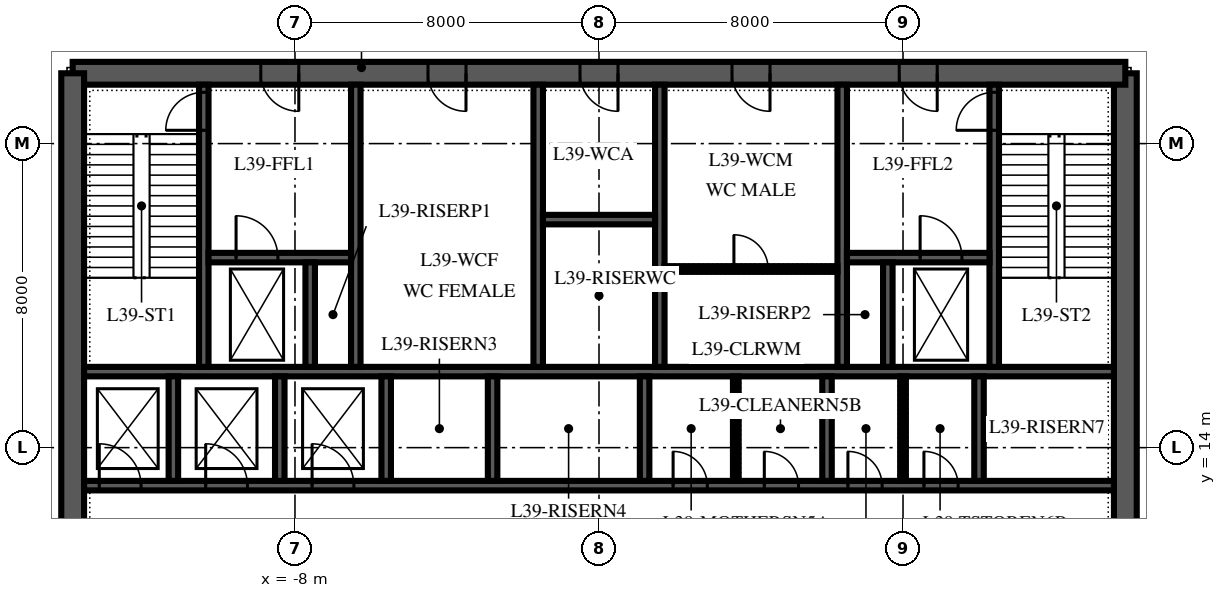
"""IFC4 building model, lengths in metres.
Left out: names, types, materials, properties, quantities, classifications, styles, units other than length and angle.
Written with IfcOpenShell. Run it as: python <this file> out.ifc"""

import sys

from ifc_helpers import new_model, si_unit, direction, frame, frame_2d, origin, place, context, subcontext, project, spatial, polyline, rectangle, outline, extrude, element, fill, save


model = new_model("IFC4")
c1 = context("Model", 3, precision=1e-05, world=origin(), true_north=direction((0.0, 1.0)))
c2 = subcontext(c1, "Body", "Model", "MODEL_VIEW")
j1 = project(units=[si_unit("LENGTHUNIT", "METRE"), si_unit("PLANEANGLEUNIT", "RADIAN")], contexts=[c1])
p1 = place(None, origin())
s1 = spatial("IfcSite", under=j1, at=p1, CompositionType="ELEMENT")
p2 = place(p1, origin())
s2 = spatial("IfcBuilding", under=s1, at=p2, CompositionType="ELEMENT")
p3 = place(p2, frame((0.0, 0.0, 173.0)))
s3 = spatial("IfcBuildingStorey", under=s2, at=p3, CompositionType="ELEMENT", Elevation=173.0)
p4 = place(p3, frame((13.85, 6.15, 0.0), z_axis=(0.0, 0.0, 1.0), x_axis=(0.0, 1.0, 0.0)))
e1 = element("IfcWall", 1, at=p4, inside=s3, PredefinedType="SHEAR", context=c2, shape_type="SweptSolid", body=[
    extrude(outline(polyline([(0.0, -0.3), (17.7, -0.3), (17.7, 0.0), (17.4, 0.0), (17.4, 0.3), (0.3, 0.3), (0.3, 0.0), (0.0, 0.0), (0.0, -0.3)])), origin(), (0.0, 0.0, 1.0), 5.0),
])
p5 = place(p4, frame((4.15, 0.0, 0.0)))
e2 = element("IfcOpeningElement", 2, at=p5, cuts=e1, PredefinedType="OPENING", context=c2, shape_type="SweptSolid", body=[
    extrude(rectangle(XDim=1.8, YDim=2.4, at=frame_2d((0.9, 1.2))), frame((0.0, 0.315, 0.0), z_axis=(0.0, -1.0, 0.0), x_axis=(1.0, 0.0, 0.0)), (0.0, 0.0, 1.0), 0.63),
])
p6 = place(p3, frame((13.85, 23.85, 0.0), z_axis=(0.0, 0.0, 1.0), x_axis=(-1.0, 0.0, 0.0)))
e3 = element("IfcWall", 3, at=p6, inside=s3, PredefinedType="SHEAR", context=c2, shape_type="SweptSolid", body=[
    extrude(rectangle(XDim=27.7, YDim=0.6, at=frame_2d((13.85, 0.0))), origin(), (0.0, 0.0, 1.0), 5.0),
])
p7 = place(p6, frame((21.75, 0.0, 0.0)))
e4 = element("IfcOpeningElement", 4, at=p7, cuts=e3, PredefinedType="OPENING", context=c2, shape_type="SweptSolid", body=[
    extrude(rectangle(XDim=1.0, YDim=2.1, at=frame_2d((0.5, 1.05))), frame((0.0, 0.315, 0.0), z_axis=(0.0, -1.0, 0.0), x_axis=(1.0, 0.0, 0.0)), (0.0, 0.0, 1.0), 0.63),
])
p8 = place(p6, frame((4.95, 0.0, 0.0)))
e5 = element("IfcOpeningElement", 5, at=p8, cuts=e3, PredefinedType="OPENING", context=c2, shape_type="SweptSolid", body=[
    extrude(rectangle(XDim=1.0, YDim=2.1, at=frame_2d((0.5, 1.05))), frame((0.0, 0.315, 0.0), z_axis=(0.0, -1.0, 0.0), x_axis=(1.0, 0.0, 0.0)), (0.0, 0.0, 1.0), 0.63),
])
p9 = place(p6, frame((17.35, 0.0, 0.0)))
e6 = element("IfcOpeningElement", 6, at=p9, cuts=e3, PredefinedType="OPENING", context=c2, shape_type="SweptSolid", body=[
    extrude(rectangle(XDim=1.0, YDim=2.1, at=frame_2d((0.5, 1.05))), frame((0.0, 0.315, 0.0), z_axis=(0.0, -1.0, 0.0), x_axis=(1.0, 0.0, 0.0)), (0.0, 0.0, 1.0), 0.63),
])
p10 = place(p6, frame((13.35, 0.0, 0.0)))
e7 = element("IfcOpeningElement", 7, at=p10, cuts=e3, PredefinedType="OPENING", context=c2, shape_type="SweptSolid", body=[
    extrude(rectangle(XDim=1.0, YDim=2.1, at=frame_2d((0.5, 1.05))), frame((0.0, 0.315, 0.0), z_axis=(0.0, -1.0, 0.0), x_axis=(1.0, 0.0, 0.0)), (0.0, 0.0, 1.0), 0.63),
])
p11 = place(p6, frame((9.35, 0.0, 0.0)))
e8 = element("IfcOpeningElement", 8, at=p11, cuts=e3, PredefinedType="OPENING", context=c2, shape_type="SweptSolid", body=[
    extrude(rectangle(XDim=1.0, YDim=2.1, at=frame_2d((0.5, 1.05))), frame((0.0, 0.315, 0.0), z_axis=(0.0, -1.0, 0.0), x_axis=(1.0, 0.0, 0.0)), (0.0, 0.0, 1.0), 0.63),
])
p12 = place(p3, frame((-13.85, 23.85, 0.0), z_axis=(0.0, 0.0, 1.0), x_axis=(0.0, -1.0, 0.0)))
e9 = element("IfcWall", 9, at=p12, inside=s3, PredefinedType="SHEAR", context=c2, shape_type="SweptSolid", body=[
    extrude(outline(polyline([(0.0, -0.3), (17.7, -0.3), (17.7, 0.0), (17.4, 0.0), (17.4, 0.3), (0.3, 0.3), (0.3, 0.0), (0.0, 0.0), (0.0, -0.3)])), origin(), (0.0, 0.0, 1.0), 5.0),
])
p13 = place(p12, frame((11.75, 0.0, 0.0)))
e10 = element("IfcOpeningElement", 10, at=p13, cuts=e9, PredefinedType="OPENING", context=c2, shape_type="SweptSolid", body=[
    extrude(rectangle(XDim=1.8, YDim=2.4, at=frame_2d((0.9, 1.2))), frame((0.0, 0.315, 0.0), z_axis=(0.0, -1.0, 0.0), x_axis=(1.0, 0.0, 0.0)), (0.0, 0.0, 1.0), 0.63),
])
p14 = place(p3, frame((-13.55, 13.0, 0.0), z_axis=(0.0, 0.0, 1.0), x_axis=(1.0, 0.0, 0.0)))
e11 = element("IfcWall", 11, at=p14, inside=s3, PredefinedType="SHEAR", context=c2, shape_type="SweptSolid", body=[
    extrude(rectangle(XDim=27.1, YDim=0.25, at=frame_2d((13.55, 0.0))), origin(), (0.0, 0.0, 1.0), 5.0),
])
p15 = place(p14, frame((0.4, 0.0, 0.0)))
e12 = element("IfcOpeningElement", 12, at=p15, cuts=e11, PredefinedType="OPENING", context=c2, shape_type="SweptSolid", body=[
    extrude(rectangle(XDim=1.1, YDim=2.1, at=frame_2d((0.55, 1.05))), frame((0.0, 0.14, 0.0), z_axis=(0.0, -1.0, 0.0), x_axis=(1.0, 0.0, 0.0)), (0.0, 0.0, 1.0), 0.28),
])
p16 = place(p14, frame((3.2, 0.0, 0.0)))
e13 = element("IfcOpeningElement", 13, at=p16, cuts=e11, PredefinedType="OPENING", context=c2, shape_type="SweptSolid", body=[
    extrude(rectangle(XDim=1.1, YDim=2.1, at=frame_2d((0.55, 1.05))), frame((0.0, 0.14, 0.0), z_axis=(0.0, -1.0, 0.0), x_axis=(1.0, 0.0, 0.0)), (0.0, 0.0, 1.0), 0.28),
])
p17 = place(p14, frame((6.0, 0.0, 0.0)))
e14 = element("IfcOpeningElement", 14, at=p17, cuts=e11, PredefinedType="OPENING", context=c2, shape_type="SweptSolid", body=[
    extrude(rectangle(XDim=1.1, YDim=2.1, at=frame_2d((0.55, 1.05))), frame((0.0, 0.14, 0.0), z_axis=(0.0, -1.0, 0.0), x_axis=(1.0, 0.0, 0.0)), (0.0, 0.0, 1.0), 0.28),
])
p18 = place(p14, frame((15.5, 0.0, 0.0)))
e15 = element("IfcOpeningElement", 15, at=p18, cuts=e11, PredefinedType="OPENING", context=c2, shape_type="SweptSolid", body=[
    extrude(rectangle(XDim=0.9, YDim=2.1, at=frame_2d((0.45, 1.05))), frame((0.0, 0.14, 0.0), z_axis=(0.0, -1.0, 0.0), x_axis=(1.0, 0.0, 0.0)), (0.0, 0.0, 1.0), 0.28),
])
p19 = place(p14, frame((17.9, 0.0, 0.0)))
e16 = element("IfcOpeningElement", 16, at=p19, cuts=e11, PredefinedType="OPENING", context=c2, shape_type="SweptSolid", body=[
    extrude(rectangle(XDim=0.9, YDim=2.1, at=frame_2d((0.45, 1.05))), frame((0.0, 0.14, 0.0), z_axis=(0.0, -1.0, 0.0), x_axis=(1.0, 0.0, 0.0)), (0.0, 0.0, 1.0), 0.28),
])
p20 = place(p14, frame((20.1, 0.0, 0.0)))
e17 = element("IfcOpeningElement", 17, at=p20, cuts=e11, PredefinedType="OPENING", context=c2, shape_type="SweptSolid", body=[
    extrude(rectangle(XDim=0.9, YDim=2.1, at=frame_2d((0.45, 1.05))), frame((0.0, 0.14, 0.0), z_axis=(0.0, -1.0, 0.0), x_axis=(1.0, 0.0, 0.0)), (0.0, 0.0, 1.0), 0.28),
])
p21 = place(p14, frame((22.1, 0.0, 0.0)))
e18 = element("IfcOpeningElement", 18, at=p21, cuts=e11, PredefinedType="OPENING", context=c2, shape_type="SweptSolid", body=[
    extrude(rectangle(XDim=0.9, YDim=2.1, at=frame_2d((0.45, 1.05))), frame((0.0, 0.14, 0.0), z_axis=(0.0, -1.0, 0.0), x_axis=(1.0, 0.0, 0.0)), (0.0, 0.0, 1.0), 0.28),
])
p22 = place(p3, frame((-13.55, 16.0, 0.0), z_axis=(0.0, 0.0, 1.0), x_axis=(1.0, 0.0, 0.0)))
e19 = element("IfcWall", 19, at=p22, inside=s3, PredefinedType="SHEAR", context=c2, shape_type="SweptSolid", body=[
    extrude(rectangle(XDim=27.1, YDim=0.25, at=frame_2d((13.55, 0.0))), origin(), (0.0, 0.0, 1.0), 5.0),
])
for number, where, z_axis, x_axis in (
    (20, (-11.2, 13.125, 0.0), (0.0, 0.0, 1.0), (0.0, 1.0, 0.0)),
    (21, (-8.4, 13.125, 0.0), (0.0, 0.0, 1.0), (0.0, 1.0, 0.0)),
    (22, (-5.6, 13.125, 0.0), (0.0, 0.0, 1.0), (0.0, 1.0, 0.0)),
    (23, (-2.8, 13.125, 0.0), (0.0, 0.0, 1.0), (0.0, 1.0, 0.0)),
    (24, (1.2, 13.125, 0.0), (0.0, 0.0, 1.0), (0.0, 1.0, 0.0)),
    (25, (6.0, 13.125, 0.0), (0.0, 0.0, 1.0), (0.0, 1.0, 0.0)),
    (26, (10.0, 13.125, 0.0), (0.0, 0.0, 1.0), (0.0, 1.0, 0.0)),
):
    element("IfcWall", number, at=place(p3, frame(where, z_axis=z_axis, x_axis=x_axis)), inside=s3, PredefinedType="SHEAR", context=c2, shape_type="SweptSolid", body=[
        extrude(rectangle(XDim=2.75, YDim=0.25, at=frame_2d((1.375, 0.0))), origin(), (0.0, 0.0, 1.0), 5.0),
    ])
p23 = place(p3, frame((-10.4, 16.125, 0.0), z_axis=(0.0, 0.0, 1.0), x_axis=(0.0, 1.0, 0.0)))
e27 = element("IfcWall", 27, at=p23, inside=s3, PredefinedType="SHEAR", context=c2, shape_type="SweptSolid", body=[
    extrude(rectangle(XDim=7.425, YDim=0.25, at=frame_2d((3.712, 0.0))), origin(), (0.0, 0.0, 1.0), 5.0),
])
p24 = place(p23, frame((6.225, 0.0, 0.0)))
e28 = element("IfcOpeningElement", 28, at=p24, cuts=e27, PredefinedType="OPENING", context=c2, shape_type="SweptSolid", body=[
    extrude(rectangle(XDim=1.0, YDim=2.1, at=frame_2d((0.5, 1.05))), frame((0.0, 0.14, 0.0), z_axis=(0.0, -1.0, 0.0), x_axis=(1.0, 0.0, 0.0)), (0.0, 0.0, 1.0), 0.28),
])
for number, where, z_axis, x_axis in (
    (29, (-6.4, 16.125, 0.0), (0.0, 0.0, 1.0), (0.0, 1.0, 0.0)),
    (30, (-1.6, 16.125, 0.0), (0.0, 0.0, 1.0), (0.0, 1.0, 0.0)),
    (31, (1.6, 16.125, 0.0), (0.0, 0.0, 1.0), (0.0, 1.0, 0.0)),
    (32, (6.4, 16.125, 0.0), (0.0, 0.0, 1.0), (0.0, 1.0, 0.0)),
):
    element("IfcWall", number, at=place(p3, frame(where, z_axis=z_axis, x_axis=x_axis)), inside=s3, PredefinedType="SHEAR", context=c2, shape_type="SweptSolid", body=[
        extrude(rectangle(XDim=7.425, YDim=0.25, at=frame_2d((3.712, 0.0))), origin(), (0.0, 0.0, 1.0), 5.0),
    ])
p25 = place(p3, frame((10.4, 16.125, 0.0), z_axis=(0.0, 0.0, 1.0), x_axis=(0.0, 1.0, 0.0)))
e33 = element("IfcWall", 33, at=p25, inside=s3, PredefinedType="SHEAR", context=c2, shape_type="SweptSolid", body=[
    extrude(rectangle(XDim=7.425, YDim=0.25, at=frame_2d((3.712, 0.0))), origin(), (0.0, 0.0, 1.0), 5.0),
])
p26 = place(p25, frame((6.225, 0.0, 0.0)))
e34 = element("IfcOpeningElement", 34, at=p26, cuts=e33, PredefinedType="OPENING", context=c2, shape_type="SweptSolid", body=[
    extrude(rectangle(XDim=1.0, YDim=2.1, at=frame_2d((0.5, 1.05))), frame((0.0, 0.14, 0.0), z_axis=(0.0, -1.0, 0.0), x_axis=(1.0, 0.0, 0.0)), (0.0, 0.0, 1.0), 0.28),
])
p27 = place(p3, frame((-10.275, 19.0, 0.0), z_axis=(0.0, 0.0, 1.0), x_axis=(1.0, 0.0, 0.0)))
e35 = element("IfcWall", 35, at=p27, inside=s3, PredefinedType="SHEAR", context=c2, shape_type="SweptSolid", body=[
    extrude(rectangle(XDim=3.75, YDim=0.25, at=frame_2d((1.875, 0.0))), origin(), (0.0, 0.0, 1.0), 5.0),
])
p28 = place(p27, frame((0.725, 0.0, 0.0)))
e36 = element("IfcOpeningElement", 36, at=p28, cuts=e35, PredefinedType="OPENING", context=c2, shape_type="SweptSolid", body=[
    extrude(rectangle(XDim=1.1, YDim=2.1, at=frame_2d((0.55, 1.05))), frame((0.0, 0.14, 0.0), z_axis=(0.0, -1.0, 0.0), x_axis=(1.0, 0.0, 0.0)), (0.0, 0.0, 1.0), 0.28),
])
p29 = place(p3, frame((6.525, 19.0, 0.0), z_axis=(0.0, 0.0, 1.0), x_axis=(1.0, 0.0, 0.0)))
e37 = element("IfcWall", 37, at=p29, inside=s3, PredefinedType="SHEAR", context=c2, shape_type="SweptSolid", body=[
    extrude(rectangle(XDim=3.75, YDim=0.25, at=frame_2d((1.875, 0.0))), origin(), (0.0, 0.0, 1.0), 5.0),
])
p30 = place(p29, frame((1.925, 0.0, 0.0)))
e38 = element("IfcOpeningElement", 38, at=p30, cuts=e37, PredefinedType="OPENING", context=c2, shape_type="SweptSolid", body=[
    extrude(rectangle(XDim=1.1, YDim=2.1, at=frame_2d((0.55, 1.05))), frame((0.0, 0.14, 0.0), z_axis=(0.0, -1.0, 0.0), x_axis=(1.0, 0.0, 0.0)), (0.0, 0.0, 1.0), 0.28),
])
for number, where, z_axis, x_axis in (
    (39, (-7.6, 16.125, 0.0), (0.0, 0.0, 1.0), (0.0, 1.0, 0.0)),
    (40, (7.6, 16.125, 0.0), (0.0, 0.0, 1.0), (0.0, 1.0, 0.0)),
):
    element("IfcWall", number, at=place(p3, frame(where, z_axis=z_axis, x_axis=x_axis)), inside=s3, PredefinedType="SHEAR", context=c2, shape_type="SweptSolid", body=[
        extrude(rectangle(XDim=2.75, YDim=0.25, at=frame_2d((1.375, 0.0))), origin(), (0.0, 0.0, 1.0), 5.0),
    ])
p31 = place(p3, frame((-1.475, 20.0, 0.0), z_axis=(0.0, 0.0, 1.0), x_axis=(1.0, 0.0, 0.0)))
e41 = element("IfcWall", 41, at=p31, inside=s3, PredefinedType="SHEAR", context=c2, shape_type="SweptSolid", body=[
    extrude(rectangle(XDim=2.95, YDim=0.25, at=frame_2d((1.475, 0.0))), origin(), (0.0, 0.0, 1.0), 5.0),
])
p32 = place(p3, frame((1.725, 18.7, 0.0), z_axis=(0.0, 0.0, 1.0), x_axis=(1.0, 0.0, 0.0)))
e42 = element("IfcWall", 42, at=p32, inside=s3, PredefinedType="PARTITIONING", context=c2, shape_type="SweptSolid", body=[
    extrude(rectangle(XDim=4.55, YDim=0.15, at=frame_2d((2.275, 0.0))), origin(), (0.0, 0.0, 1.0), 4.85),
])
p33 = place(p32, frame((1.825, 0.0, 0.0)))
e43 = element("IfcOpeningElement", 43, at=p33, cuts=e42, PredefinedType="OPENING", context=c2, shape_type="SweptSolid", body=[
    extrude(rectangle(XDim=0.9, YDim=2.1, at=frame_2d((0.45, 1.05))), frame((0.0, 0.09, 0.0), z_axis=(0.0, -1.0, 0.0), x_axis=(1.0, 0.0, 0.0)), (0.0, 0.0, 1.0), 0.18),
])
for number, where, z_axis, x_axis in (
    (44, (3.6, 13.125, 0.0), (0.0, 0.0, 1.0), (0.0, 1.0, 0.0)),
    (45, (8.0, 13.125, 0.0), (0.0, 0.0, 1.0), (0.0, 1.0, 0.0)),
):
    element("IfcWall", number, at=place(p3, frame(where, z_axis=z_axis, x_axis=x_axis)), inside=s3, PredefinedType="PARTITIONING", context=c2, shape_type="SweptSolid", body=[
        extrude(rectangle(XDim=2.75, YDim=0.15, at=frame_2d((1.375, 0.0))), origin(), (0.0, 0.0, 1.0), 4.85),
    ])
p34 = place(p7, origin())
e46 = element("IfcDoor", 46, at=p34, inside=s3, OperationType="SINGLE_SWING_RIGHT", PredefinedType="DOOR", context=c2, shape_type="SweptSolid", body=[
    extrude(rectangle(XDim=1.0, YDim=2.1, at=frame_2d((0.5, 1.05))), frame((0.0, 0.3, 0.0), z_axis=(0.0, -1.0, 0.0), x_axis=(1.0, 0.0, 0.0)), (0.0, 0.0, 1.0), 0.6),
])
fill(e4, e46)
p35 = place(p8, origin())
e47 = element("IfcDoor", 47, at=p35, inside=s3, OperationType="SINGLE_SWING_RIGHT", PredefinedType="DOOR", context=c2, shape_type="SweptSolid", body=[
    extrude(rectangle(XDim=1.0, YDim=2.1, at=frame_2d((0.5, 1.05))), frame((0.0, 0.3, 0.0), z_axis=(0.0, -1.0, 0.0), x_axis=(1.0, 0.0, 0.0)), (0.0, 0.0, 1.0), 0.6),
])
fill(e5, e47)
p36 = place(p9, origin())
e48 = element("IfcDoor", 48, at=p36, inside=s3, OperationType="SINGLE_SWING_LEFT", PredefinedType="DOOR", context=c2, shape_type="SweptSolid", body=[
    extrude(rectangle(XDim=1.0, YDim=2.1, at=frame_2d((0.5, 1.05))), frame((0.0, 0.3, 0.0), z_axis=(0.0, -1.0, 0.0), x_axis=(1.0, 0.0, 0.0)), (0.0, 0.0, 1.0), 0.6),
])
fill(e6, e48)
p37 = place(p10, origin())
e49 = element("IfcDoor", 49, at=p37, inside=s3, OperationType="SINGLE_SWING_LEFT", PredefinedType="DOOR", context=c2, shape_type="SweptSolid", body=[
    extrude(rectangle(XDim=1.0, YDim=2.1, at=frame_2d((0.5, 1.05))), frame((0.0, 0.3, 0.0), z_axis=(0.0, -1.0, 0.0), x_axis=(1.0, 0.0, 0.0)), (0.0, 0.0, 1.0), 0.6),
])
fill(e7, e49)
p38 = place(p11, origin())
e50 = element("IfcDoor", 50, at=p38, inside=s3, OperationType="SINGLE_SWING_LEFT", PredefinedType="DOOR", context=c2, shape_type="SweptSolid", body=[
    extrude(rectangle(XDim=1.0, YDim=2.1, at=frame_2d((0.5, 1.05))), frame((0.0, 0.3, 0.0), z_axis=(0.0, -1.0, 0.0), x_axis=(1.0, 0.0, 0.0)), (0.0, 0.0, 1.0), 0.6),
])
fill(e8, e50)
p39 = place(p24, origin())
e51 = element("IfcDoor", 51, at=p39, inside=s3, OperationType="SINGLE_SWING_LEFT", PredefinedType="DOOR", context=c2, shape_type="SweptSolid", body=[
    extrude(rectangle(XDim=1.0, YDim=2.1, at=frame_2d((0.5, 1.05))), frame((0.0, 0.125, 0.0), z_axis=(0.0, -1.0, 0.0), x_axis=(1.0, 0.0, 0.0)), (0.0, 0.0, 1.0), 0.25),
])
fill(e28, e51)
p40 = place(p26, origin())
e52 = element("IfcDoor", 52, at=p40, inside=s3, OperationType="SINGLE_SWING_LEFT", PredefinedType="DOOR", context=c2, shape_type="SweptSolid", body=[
    extrude(rectangle(XDim=1.0, YDim=2.1, at=frame_2d((0.5, 1.05))), frame((0.0, 0.125, 0.0), z_axis=(0.0, -1.0, 0.0), x_axis=(1.0, 0.0, 0.0)), (0.0, 0.0, 1.0), 0.25),
])
fill(e34, e52)
p41 = place(p15, origin())
e53 = element("IfcDoor", 53, at=p41, inside=s3, OperationType="SLIDING_TO_LEFT", PredefinedType="DOOR", context=c2, shape_type="SweptSolid", body=[
    extrude(rectangle(XDim=1.1, YDim=2.1, at=frame_2d((0.55, 1.05))), frame((0.0, 0.125, 0.0), z_axis=(0.0, -1.0, 0.0), x_axis=(1.0, 0.0, 0.0)), (0.0, 0.0, 1.0), 0.25),
])
fill(e12, e53)
p42 = place(p16, origin())
e54 = element("IfcDoor", 54, at=p42, inside=s3, OperationType="SLIDING_TO_LEFT", PredefinedType="DOOR", context=c2, shape_type="SweptSolid", body=[
    extrude(rectangle(XDim=1.1, YDim=2.1, at=frame_2d((0.55, 1.05))), frame((0.0, 0.125, 0.0), z_axis=(0.0, -1.0, 0.0), x_axis=(1.0, 0.0, 0.0)), (0.0, 0.0, 1.0), 0.25),
])
fill(e13, e54)
p43 = place(p17, origin())
e55 = element("IfcDoor", 55, at=p43, inside=s3, OperationType="SLIDING_TO_LEFT", PredefinedType="DOOR", context=c2, shape_type="SweptSolid", body=[
    extrude(rectangle(XDim=1.1, YDim=2.1, at=frame_2d((0.55, 1.05))), frame((0.0, 0.125, 0.0), z_axis=(0.0, -1.0, 0.0), x_axis=(1.0, 0.0, 0.0)), (0.0, 0.0, 1.0), 0.25),
])
fill(e14, e55)
p44 = place(p30, origin())
e56 = element("IfcDoor", 56, at=p44, inside=s3, OperationType="SLIDING_TO_RIGHT", PredefinedType="DOOR", context=c2, shape_type="SweptSolid", body=[
    extrude(rectangle(XDim=1.1, YDim=2.1, at=frame_2d((0.55, 1.05))), frame((0.0, 0.125, 0.0), z_axis=(0.0, -1.0, 0.0), x_axis=(1.0, 0.0, 0.0)), (0.0, 0.0, 1.0), 0.25),
])
fill(e38, e56)
p45 = place(p28, origin())
e57 = element("IfcDoor", 57, at=p45, inside=s3, OperationType="SLIDING_TO_RIGHT", PredefinedType="DOOR", context=c2, shape_type="SweptSolid", body=[
    extrude(rectangle(XDim=1.1, YDim=2.1, at=frame_2d((0.55, 1.05))), frame((0.0, 0.125, 0.0), z_axis=(0.0, -1.0, 0.0), x_axis=(1.0, 0.0, 0.0)), (0.0, 0.0, 1.0), 0.25),
])
fill(e36, e57)
p46 = place(p18, origin())
e58 = element("IfcDoor", 58, at=p46, inside=s3, OperationType="SINGLE_SWING_LEFT", PredefinedType="DOOR", context=c2, shape_type="SweptSolid", body=[
    extrude(rectangle(XDim=0.9, YDim=2.1, at=frame_2d((0.45, 1.05))), frame((0.0, 0.125, 0.0), z_axis=(0.0, -1.0, 0.0), x_axis=(1.0, 0.0, 0.0)), (0.0, 0.0, 1.0), 0.25),
])
fill(e15, e58)
p47 = place(p19, origin())
e59 = element("IfcDoor", 59, at=p47, inside=s3, OperationType="SINGLE_SWING_LEFT", PredefinedType="DOOR", context=c2, shape_type="SweptSolid", body=[
    extrude(rectangle(XDim=0.9, YDim=2.1, at=frame_2d((0.45, 1.05))), frame((0.0, 0.125, 0.0), z_axis=(0.0, -1.0, 0.0), x_axis=(1.0, 0.0, 0.0)), (0.0, 0.0, 1.0), 0.25),
])
fill(e16, e59)
p48 = place(p20, origin())
e60 = element("IfcDoor", 60, at=p48, inside=s3, OperationType="SINGLE_SWING_LEFT", PredefinedType="DOOR", context=c2, shape_type="SweptSolid", body=[
    extrude(rectangle(XDim=0.9, YDim=2.1, at=frame_2d((0.45, 1.05))), frame((0.0, 0.125, 0.0), z_axis=(0.0, -1.0, 0.0), x_axis=(1.0, 0.0, 0.0)), (0.0, 0.0, 1.0), 0.25),
])
fill(e17, e60)
p49 = place(p21, origin())
e61 = element("IfcDoor", 61, at=p49, inside=s3, OperationType="SINGLE_SWING_LEFT", PredefinedType="DOOR", context=c2, shape_type="SweptSolid", body=[
    extrude(rectangle(XDim=0.9, YDim=2.1, at=frame_2d((0.45, 1.05))), frame((0.0, 0.125, 0.0), z_axis=(0.0, -1.0, 0.0), x_axis=(1.0, 0.0, 0.0)), (0.0, 0.0, 1.0), 0.25),
])
fill(e18, e61)
p50 = place(p33, origin())
e62 = element("IfcDoor", 62, at=p50, inside=s3, OperationType="SINGLE_SWING_LEFT", PredefinedType="DOOR", context=c2, shape_type="SweptSolid", body=[
    extrude(rectangle(XDim=0.9, YDim=2.1, at=frame_2d((0.45, 1.05))), frame((0.0, 0.075, 0.0), z_axis=(0.0, -1.0, 0.0), x_axis=(1.0, 0.0, 0.0)), (0.0, 0.0, 1.0), 0.149),
])
fill(e43, e62)
save(model, sys.argv[1])
